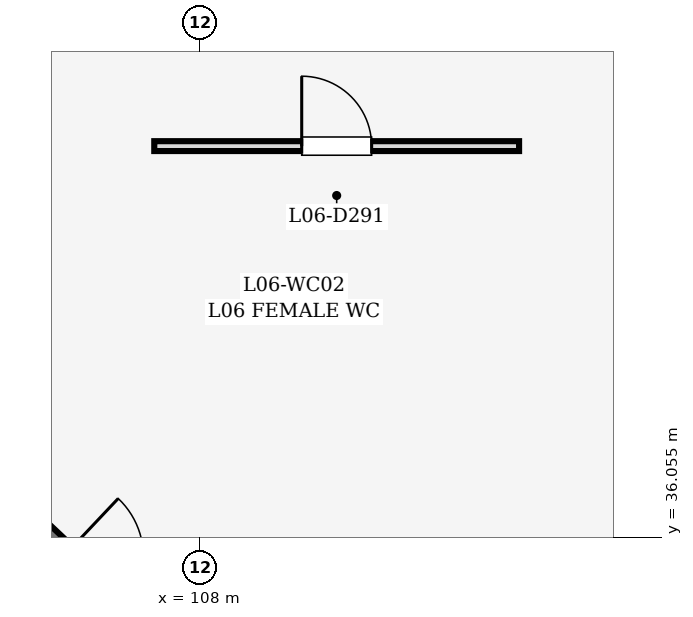
"""IFC4 building model, lengths in metres.
Left out: names, types, materials, properties, quantities, classifications, styles, units other than length and angle.
Written with IfcOpenShell. Run it as: python <this file> out.ifc"""

import sys

from ifc_helpers import new_model, si_unit, direction, frame, frame_2d, origin, place, context, subcontext, project, spatial, rectangle, extrude, element, fill, save


model = new_model("IFC4")
c1 = context("Model", 3, precision=1e-05, world=origin(), true_north=direction((0.0, 1.0)))
c2 = subcontext(c1, "Body", "Model", "MODEL_VIEW")
j1 = project(units=[si_unit("LENGTHUNIT", "METRE"), si_unit("PLANEANGLEUNIT", "RADIAN")], contexts=[c1])
p1 = place(None, origin())
s1 = spatial("IfcSite", under=j1, at=p1, CompositionType="ELEMENT")
p2 = place(p1, origin())
s2 = spatial("IfcBuilding", under=s1, at=p2, CompositionType="ELEMENT")
p3 = place(p2, frame((0.0, 0.0, 23.7)))
s3 = spatial("IfcBuildingStorey", under=s2, at=p3, CompositionType="ELEMENT", Elevation=23.7)
p4 = place(p3, frame((105.233, 36.704, 0.0), z_axis=(0.0, 0.0, 1.0), x_axis=(0.727127996206, -0.686501913423, 0.0)))
e1 = element("IfcWall", 1, at=p4, inside=s3, PredefinedType="SOLIDWALL", context=c2, shape_type="SweptSolid", body=[
    extrude(rectangle(XDim=3.714, YDim=0.38, at=frame_2d((1.857, 0.0))), origin(), (0.0, 0.0, 1.0), 4.5),
])
p5 = place(p4, frame((1.327, 0.0, 0.0)))
e2 = element("IfcOpeningElement", 2, at=p5, cuts=e1, PredefinedType="OPENING", context=c2, shape_type="SweptSolid", body=[
    extrude(rectangle(XDim=1.06, YDim=2.24, at=frame_2d((0.53, 1.12))), frame((0.0, 0.202, 0.0), z_axis=(0.0, -1.0, 0.0), x_axis=(1.0, 0.0, 0.0)), (0.0, 0.0, 1.0), 0.404),
])
p6 = place(p3, frame((107.4, 41.2, 0.0), z_axis=(0.0, 0.0, 1.0), x_axis=(1.0, 0.0, 0.0)))
e3 = element("IfcWall", 3, at=p6, inside=s3, PredefinedType="PARTITIONING", context=c2, shape_type="SweptSolid", body=[
    extrude(rectangle(XDim=4.8, YDim=0.13, at=frame_2d((2.4, 0.0))), origin(), (0.0, 0.0, 1.0), 4.485),
])
p7 = place(p6, frame((1.94, 0.0, 0.0)))
e4 = element("IfcOpeningElement", 4, at=p7, cuts=e3, PredefinedType="OPENING", context=c2, shape_type="SweptSolid", body=[
    extrude(rectangle(XDim=0.92, YDim=2.1, at=frame_2d((0.46, 1.05))), frame((0.0, 0.077, 0.0), z_axis=(0.0, -1.0, 0.0), x_axis=(1.0, 0.0, 0.0)), (0.0, 0.0, 1.0), 0.154),
])
p8 = place(p7, origin())
e5 = element("IfcDoor", 5, at=p8, inside=s3, OperationType="SINGLE_SWING_LEFT", PredefinedType="DOOR", context=c2, shape_type="SweptSolid", body=[
    extrude(rectangle(XDim=0.92, YDim=2.1, at=frame_2d((0.46, 1.05))), frame((0.0, 0.025, 0.0), z_axis=(0.0, -1.0, 0.0), x_axis=(1.0, 0.0, 0.0)), (0.0, 0.0, 1.0), 0.05),
])
fill(e4, e5)
save(model, sys.argv[1])
